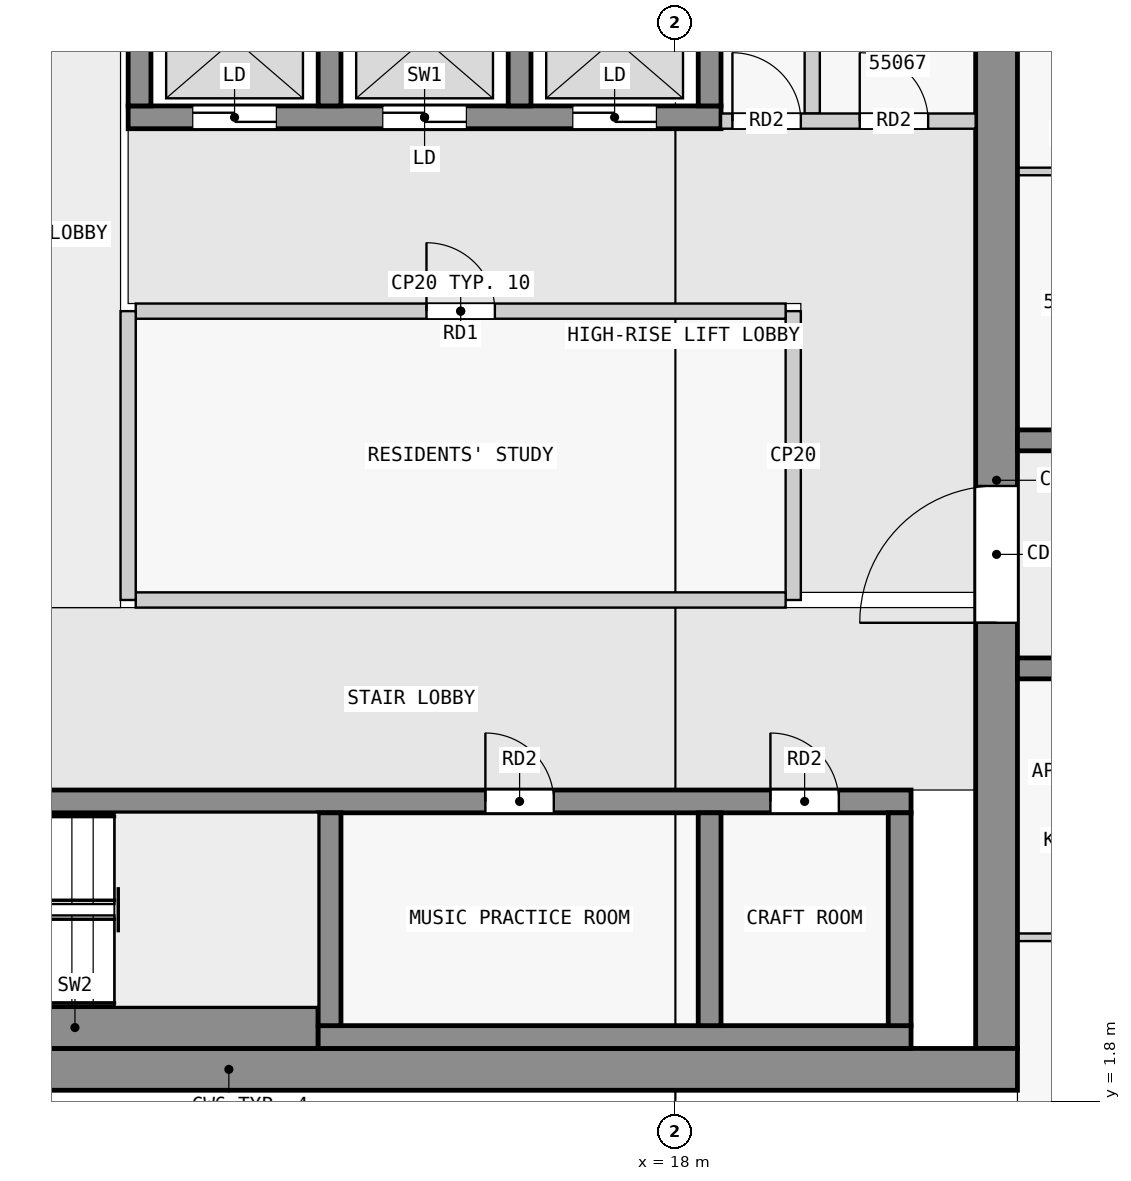
"""IFC4 building model, lengths in metres.
Left out: names, types, materials, properties, quantities, classifications, styles, units other than length and angle.
Written with IfcOpenShell. Run it as: python <this file> out.ifc"""

import sys

from ifc_helpers import new_model, si_unit, direction, frame, frame_2d, origin, place, context, subcontext, project, spatial, rectangle, extrude, element, fill, save


model = new_model("IFC4")
c1 = context("Model", 3, precision=1e-05, world=origin(), true_north=direction((0.0, 1.0)))
c2 = subcontext(c1, "Body", "Model", "MODEL_VIEW")
j1 = project(units=[si_unit("LENGTHUNIT", "METRE"), si_unit("PLANEANGLEUNIT", "RADIAN")], contexts=[c1])
p1 = place(None, origin())
s1 = spatial("IfcSite", under=j1, at=p1, CompositionType="ELEMENT")
p2 = place(p1, origin())
s2 = spatial("IfcBuilding", under=s1, at=p2, CompositionType="ELEMENT")
p3 = place(p2, frame((0.0, 0.0, 211.9)))
s3 = spatial("IfcBuildingStorey", under=s2, at=p3, CompositionType="ELEMENT", Elevation=211.9)
p4 = place(p3, frame((1.75, 2.225, 0.0), z_axis=(0.0, 0.0, 1.0), x_axis=(1.0, 0.0, 0.0)))
e1 = element("IfcWall", 1, at=p4, inside=s3, PredefinedType="SHEAR", context=c2, shape_type="SweptSolid", body=[
    extrude(rectangle(XDim=20.75, YDim=0.55, at=frame_2d((10.375, 0.0))), origin(), (0.0, 0.0, 1.0), 3.25),
])
p5 = place(p3, frame((22.225, 2.5, 0.0), z_axis=(0.0, 0.0, 1.0), x_axis=(0.0, 1.0, 0.0)))
e2 = element("IfcWall", 2, at=p5, inside=s3, PredefinedType="SHEAR", context=c2, shape_type="SweptSolid", body=[
    extrude(rectangle(XDim=14.95, YDim=0.55, at=frame_2d((7.475, 0.0))), origin(), (0.0, 0.0, 1.0), 3.25),
])
p6 = place(p5, frame((5.6, 0.0, 0.0)))
e3 = element("IfcOpeningElement", 3, at=p6, cuts=e2, PredefinedType="OPENING", context=c2, shape_type="SweptSolid", body=[
    extrude(rectangle(XDim=1.8, YDim=2.1, at=frame_2d((0.9, 1.05))), frame((0.0, 0.285, 0.0), z_axis=(0.0, -1.0, 0.0), x_axis=(1.0, 0.0, 0.0)), (0.0, 0.0, 1.0), 0.57),
])
p7 = place(p3, frame((6.9, 2.775, 0.0), z_axis=(0.0, 0.0, 1.0), x_axis=(1.0, 0.0, 0.0)))
e4 = element("IfcWall", 4, at=p7, inside=s3, PredefinedType="SHEAR", context=c2, shape_type="SweptSolid", body=[
    extrude(rectangle(XDim=6.4, YDim=0.55, at=frame_2d((3.2, 0.0))), origin(), (0.0, 0.0, 1.0), 3.25),
])
p8 = place(p3, frame((13.3, 2.65, 0.0), z_axis=(0.0, 0.0, 1.0), x_axis=(1.0, 0.0, 0.0)))
e5 = element("IfcWall", 5, at=p8, inside=s3, PredefinedType="SHEAR", context=c2, shape_type="SweptSolid", body=[
    extrude(rectangle(XDim=7.8, YDim=0.3, at=frame_2d((3.9, 0.0))), origin(), (0.0, 0.0, 1.0), 3.25),
])
for number, where, z_axis, x_axis in (
    (6, (13.45, 2.8, 0.0), (0.0, 0.0, 1.0), (0.0, 1.0, 0.0)),
    (7, (18.45, 2.8, 0.0), (0.0, 0.0, 1.0), (0.0, 1.0, 0.0)),
    (8, (20.95, 2.8, 0.0), (0.0, 0.0, 1.0), (0.0, 1.0, 0.0)),
):
    element("IfcWall", number, at=place(p3, frame(where, z_axis=z_axis, x_axis=x_axis)), inside=s3, PredefinedType="SHEAR", context=c2, shape_type="SweptSolid", body=[
        extrude(rectangle(XDim=2.8, YDim=0.3, at=frame_2d((1.4, 0.0))), origin(), (0.0, 0.0, 1.0), 3.25),
    ])
p9 = place(p3, frame((2.3, 5.75, 0.0), z_axis=(0.0, 0.0, 1.0), x_axis=(1.0, 0.0, 0.0)))
e9 = element("IfcWall", 9, at=p9, inside=s3, PredefinedType="SHEAR", context=c2, shape_type="SweptSolid", body=[
    extrude(rectangle(XDim=18.8, YDim=0.3, at=frame_2d((9.4, 0.0))), origin(), (0.0, 0.0, 1.0), 3.25),
])
p10 = place(p9, frame((4.65, 0.0, 0.0)))
e10 = element("IfcOpeningElement", 10, at=p10, cuts=e9, PredefinedType="OPENING", context=c2, shape_type="SweptSolid", body=[
    extrude(rectangle(XDim=1.1, YDim=2.1, at=frame_2d((0.55, 1.05))), frame((0.0, 0.16, 0.0), z_axis=(0.0, -1.0, 0.0), x_axis=(1.0, 0.0, 0.0)), (0.0, 0.0, 1.0), 0.32),
])
p11 = place(p9, frame((0.45, 0.0, 0.0)))
e11 = element("IfcOpeningElement", 11, at=p11, cuts=e9, PredefinedType="OPENING", context=c2, shape_type="SweptSolid", body=[
    extrude(rectangle(XDim=1.1, YDim=2.1, at=frame_2d((0.55, 1.05))), frame((0.0, 0.16, 0.0), z_axis=(0.0, -1.0, 0.0), x_axis=(1.0, 0.0, 0.0)), (0.0, 0.0, 1.0), 0.32),
])
p12 = place(p9, frame((2.75, 0.0, 0.0)))
e12 = element("IfcOpeningElement", 12, at=p12, cuts=e9, PredefinedType="OPENING", context=c2, shape_type="SweptSolid", body=[
    extrude(rectangle(XDim=1.1, YDim=2.1, at=frame_2d((0.55, 1.05))), frame((0.0, 0.16, 0.0), z_axis=(0.0, -1.0, 0.0), x_axis=(1.0, 0.0, 0.0)), (0.0, 0.0, 1.0), 0.32),
])
p13 = place(p9, frame((13.2, 0.0, 0.0)))
e13 = element("IfcOpeningElement", 13, at=p13, cuts=e9, PredefinedType="OPENING", context=c2, shape_type="SweptSolid", body=[
    extrude(rectangle(XDim=0.9, YDim=2.1, at=frame_2d((0.45, 1.05))), frame((0.0, 0.16, 0.0), z_axis=(0.0, -1.0, 0.0), x_axis=(1.0, 0.0, 0.0)), (0.0, 0.0, 1.0), 0.32),
])
p14 = place(p9, frame((16.95, 0.0, 0.0)))
e14 = element("IfcOpeningElement", 14, at=p14, cuts=e9, PredefinedType="OPENING", context=c2, shape_type="SweptSolid", body=[
    extrude(rectangle(XDim=0.9, YDim=2.1, at=frame_2d((0.45, 1.05))), frame((0.0, 0.16, 0.0), z_axis=(0.0, -1.0, 0.0), x_axis=(1.0, 0.0, 0.0)), (0.0, 0.0, 1.0), 0.32),
])
p15 = place(p3, frame((10.8, 14.75, 0.0), z_axis=(0.0, 0.0, 1.0), x_axis=(1.0, 0.0, 0.0)))
e15 = element("IfcWall", 15, at=p15, inside=s3, PredefinedType="SHEAR", context=c2, shape_type="SweptSolid", body=[
    extrude(rectangle(XDim=7.8, YDim=0.3, at=frame_2d((3.9, 0.0))), origin(), (0.0, 0.0, 1.0), 3.25),
])
p16 = place(p15, frame((0.85, 0.0, 0.0)))
e16 = element("IfcOpeningElement", 16, at=p16, cuts=e15, PredefinedType="OPENING", context=c2, shape_type="SweptSolid", body=[
    extrude(rectangle(XDim=1.1, YDim=2.1, at=frame_2d((0.55, 1.05))), frame((0.0, 0.16, 0.0), z_axis=(0.0, -1.0, 0.0), x_axis=(1.0, 0.0, 0.0)), (0.0, 0.0, 1.0), 0.32),
])
p17 = place(p15, frame((3.35, 0.0, 0.0)))
e17 = element("IfcOpeningElement", 17, at=p17, cuts=e15, PredefinedType="OPENING", context=c2, shape_type="SweptSolid", body=[
    extrude(rectangle(XDim=1.1, YDim=2.1, at=frame_2d((0.55, 1.05))), frame((0.0, 0.16, 0.0), z_axis=(0.0, -1.0, 0.0), x_axis=(1.0, 0.0, 0.0)), (0.0, 0.0, 1.0), 0.32),
])
p18 = place(p15, frame((5.85, 0.0, 0.0)))
e18 = element("IfcOpeningElement", 18, at=p18, cuts=e15, PredefinedType="OPENING", context=c2, shape_type="SweptSolid", body=[
    extrude(rectangle(XDim=1.1, YDim=2.1, at=frame_2d((0.55, 1.05))), frame((0.0, 0.16, 0.0), z_axis=(0.0, -1.0, 0.0), x_axis=(1.0, 0.0, 0.0)), (0.0, 0.0, 1.0), 0.32),
])
for number, where, z_axis, x_axis in (
    (19, (10.95, 14.9, 0.0), (0.0, 0.0, 1.0), (0.0, 1.0, 0.0)),
    (20, (13.45, 14.9, 0.0), (0.0, 0.0, 1.0), (0.0, 1.0, 0.0)),
    (21, (15.95, 14.9, 0.0), (0.0, 0.0, 1.0), (0.0, 1.0, 0.0)),
    (22, (18.45, 14.9, 0.0), (0.0, 0.0, 1.0), (0.0, 1.0, 0.0)),
):
    element("IfcWall", number, at=place(p3, frame(where, z_axis=z_axis, x_axis=x_axis)), inside=s3, PredefinedType="SHEAR", context=c2, shape_type="SweptSolid", body=[
        extrude(rectangle(XDim=2.0, YDim=0.3, at=frame_2d((1.0, 0.0))), origin(), (0.0, 0.0, 1.0), 3.25),
    ])
p19 = place(p3, frame((22.5, 7.5, 0.0), z_axis=(0.0, 0.0, 1.0), x_axis=(1.0, 0.0, 0.0)))
e23 = element("IfcWall", 23, at=p19, inside=s3, PredefinedType="SHEAR", context=c2, shape_type="SweptSolid", body=[
    extrude(rectangle(XDim=22.5, YDim=0.275, at=frame_2d((11.25, 0.0))), origin(), (0.0, 0.0, 1.0), 3.25),
])
p20 = place(p19, frame((4.05, 0.0, 0.0)))
e24 = element("IfcOpeningElement", 24, at=p20, cuts=e23, PredefinedType="OPENING", context=c2, shape_type="SweptSolid", body=[
    extrude(rectangle(XDim=1.0, YDim=2.1, at=frame_2d((0.5, 1.05))), frame((0.0, 0.147, 0.0), z_axis=(0.0, -1.0, 0.0), x_axis=(1.0, 0.0, 0.0)), (0.0, 0.0, 1.0), 0.295),
])
p21 = place(p19, frame((10.75, 0.0, 0.0)))
e25 = element("IfcOpeningElement", 25, at=p21, cuts=e23, PredefinedType="OPENING", context=c2, shape_type="SweptSolid", body=[
    extrude(rectangle(XDim=1.0, YDim=2.1, at=frame_2d((0.5, 1.05))), frame((0.0, 0.147, 0.0), z_axis=(0.0, -1.0, 0.0), x_axis=(1.0, 0.0, 0.0)), (0.0, 0.0, 1.0), 0.295),
])
p22 = place(p19, frame((15.25, 0.0, 0.0)))
e26 = element("IfcOpeningElement", 26, at=p22, cuts=e23, PredefinedType="OPENING", context=c2, shape_type="SweptSolid", body=[
    extrude(rectangle(XDim=1.0, YDim=2.1, at=frame_2d((0.5, 1.05))), frame((0.0, 0.147, 0.0), z_axis=(0.0, -1.0, 0.0), x_axis=(1.0, 0.0, 0.0)), (0.0, 0.0, 1.0), 0.295),
])
p23 = place(p19, frame((18.75, 0.0, 0.0)))
e27 = element("IfcOpeningElement", 27, at=p23, cuts=e23, PredefinedType="OPENING", context=c2, shape_type="SweptSolid", body=[
    extrude(rectangle(XDim=0.9, YDim=2.1, at=frame_2d((0.45, 1.05))), frame((0.0, 0.147, 0.0), z_axis=(0.0, -1.0, 0.0), x_axis=(1.0, 0.0, 0.0)), (0.0, 0.0, 1.0), 0.295),
])
p24 = place(p19, frame((20.95, 0.0, 0.0)))
e28 = element("IfcOpeningElement", 28, at=p24, cuts=e23, PredefinedType="OPENING", context=c2, shape_type="SweptSolid", body=[
    extrude(rectangle(XDim=1.0, YDim=2.1, at=frame_2d((0.5, 1.05))), frame((0.0, 0.147, 0.0), z_axis=(0.0, -1.0, 0.0), x_axis=(1.0, 0.0, 0.0)), (0.0, 0.0, 1.0), 0.295),
])
p25 = place(p3, frame((22.5, 10.5, 0.0), z_axis=(0.0, 0.0, 1.0), x_axis=(1.0, 0.0, 0.0)))
e29 = element("IfcWall", 29, at=p25, inside=s3, PredefinedType="SHEAR", context=c2, shape_type="SweptSolid", body=[
    extrude(rectangle(XDim=22.5, YDim=0.275, at=frame_2d((11.25, 0.0))), origin(), (0.0, 0.0, 1.0), 3.25),
])
p26 = place(p25, frame((1.75, 0.0, 0.0)))
e30 = element("IfcOpeningElement", 30, at=p26, cuts=e29, PredefinedType="OPENING", context=c2, shape_type="SweptSolid", body=[
    extrude(rectangle(XDim=1.0, YDim=2.1, at=frame_2d((0.5, 1.05))), frame((0.0, 0.147, 0.0), z_axis=(0.0, -1.0, 0.0), x_axis=(1.0, 0.0, 0.0)), (0.0, 0.0, 1.0), 0.295),
])
p27 = place(p25, frame((5.85, 0.0, 0.0)))
e31 = element("IfcOpeningElement", 31, at=p27, cuts=e29, PredefinedType="OPENING", context=c2, shape_type="SweptSolid", body=[
    extrude(rectangle(XDim=1.8, YDim=2.1, at=frame_2d((0.9, 1.05))), frame((0.0, 0.147, 0.0), z_axis=(0.0, -1.0, 0.0), x_axis=(1.0, 0.0, 0.0)), (0.0, 0.0, 1.0), 0.295),
])
p28 = place(p25, frame((10.75, 0.0, 0.0)))
e32 = element("IfcOpeningElement", 32, at=p28, cuts=e29, PredefinedType="OPENING", context=c2, shape_type="SweptSolid", body=[
    extrude(rectangle(XDim=1.0, YDim=2.1, at=frame_2d((0.5, 1.05))), frame((0.0, 0.147, 0.0), z_axis=(0.0, -1.0, 0.0), x_axis=(1.0, 0.0, 0.0)), (0.0, 0.0, 1.0), 0.295),
])
p29 = place(p25, frame((16.85, 0.0, 0.0)))
e33 = element("IfcOpeningElement", 33, at=p29, cuts=e29, PredefinedType="OPENING", context=c2, shape_type="SweptSolid", body=[
    extrude(rectangle(XDim=1.0, YDim=2.1, at=frame_2d((0.5, 1.05))), frame((0.0, 0.147, 0.0), z_axis=(0.0, -1.0, 0.0), x_axis=(1.0, 0.0, 0.0)), (0.0, 0.0, 1.0), 0.295),
])
p30 = place(p3, frame((10.8, 8.4, 0.0), z_axis=(0.0, 0.0, 1.0), x_axis=(0.0, 1.0, 0.0)))
e34 = element("IfcWall", 34, at=p30, inside=s3, PredefinedType="PARTITIONING", context=c2, shape_type="SweptSolid", body=[
    extrude(rectangle(XDim=3.8, YDim=0.2, at=frame_2d((1.9, 0.0))), origin(), (0.0, 0.0, 1.0), 3.25),
])
p31 = place(p3, frame((10.9, 8.4, 0.0), z_axis=(0.0, 0.0, 1.0), x_axis=(1.0, 0.0, 0.0)))
e35 = element("IfcWall", 35, at=p31, inside=s3, PredefinedType="PARTITIONING", context=c2, shape_type="SweptSolid", body=[
    extrude(rectangle(XDim=8.55, YDim=0.2, at=frame_2d((4.275, 0.0))), origin(), (0.0, 0.0, 1.0), 3.25),
])
p32 = place(p3, frame((19.55, 8.4, 0.0), z_axis=(0.0, 0.0, 1.0), x_axis=(0.0, 1.0, 0.0)))
e36 = element("IfcWall", 36, at=p32, inside=s3, PredefinedType="PARTITIONING", context=c2, shape_type="SweptSolid", body=[
    extrude(rectangle(XDim=3.8, YDim=0.2, at=frame_2d((1.9, 0.0))), origin(), (0.0, 0.0, 1.0), 3.25),
])
p33 = place(p3, frame((10.9, 12.2, 0.0), z_axis=(0.0, 0.0, 1.0), x_axis=(1.0, 0.0, 0.0)))
e37 = element("IfcWall", 37, at=p33, inside=s3, PredefinedType="PARTITIONING", context=c2, shape_type="SweptSolid", body=[
    extrude(rectangle(XDim=8.55, YDim=0.2, at=frame_2d((4.275, 0.0))), origin(), (0.0, 0.0, 1.0), 3.25),
])
p34 = place(p33, frame((3.825, 0.0, 0.0)))
e38 = element("IfcOpeningElement", 38, at=p34, cuts=e37, PredefinedType="OPENING", context=c2, shape_type="SweptSolid", body=[
    extrude(rectangle(XDim=0.9, YDim=2.1, at=frame_2d((0.45, 1.05))), frame((0.0, 0.11, 0.0), z_axis=(0.0, -1.0, 0.0), x_axis=(1.0, 0.0, 0.0)), (0.0, 0.0, 1.0), 0.22),
])
p35 = place(p3, frame((18.6, 14.7, 0.0), z_axis=(0.0, 0.0, 1.0), x_axis=(1.0, 0.0, 0.0)))
e39 = element("IfcWall", 39, at=p35, inside=s3, PredefinedType="PARTITIONING", context=c2, shape_type="SweptSolid", body=[
    extrude(rectangle(XDim=3.35, YDim=0.2, at=frame_2d((1.675, 0.0))), origin(), (0.0, 0.0, 1.0), 3.25),
])
p36 = place(p35, frame((0.15, 0.0, 0.0)))
e40 = element("IfcOpeningElement", 40, at=p36, cuts=e39, PredefinedType="OPENING", context=c2, shape_type="SweptSolid", body=[
    extrude(rectangle(XDim=0.9, YDim=2.1, at=frame_2d((0.45, 1.05))), frame((0.0, 0.11, 0.0), z_axis=(0.0, -1.0, 0.0), x_axis=(1.0, 0.0, 0.0)), (0.0, 0.0, 1.0), 0.22),
])
p37 = place(p35, frame((1.825, 0.0, 0.0)))
e41 = element("IfcOpeningElement", 41, at=p37, cuts=e39, PredefinedType="OPENING", context=c2, shape_type="SweptSolid", body=[
    extrude(rectangle(XDim=0.9, YDim=2.1, at=frame_2d((0.45, 1.05))), frame((0.0, 0.11, 0.0), z_axis=(0.0, -1.0, 0.0), x_axis=(1.0, 0.0, 0.0)), (0.0, 0.0, 1.0), 0.22),
])
p38 = place(p3, frame((19.8, 14.8, 0.0), z_axis=(0.0, 0.0, 1.0), x_axis=(0.0, 1.0, 0.0)))
e42 = element("IfcWall", 42, at=p38, inside=s3, PredefinedType="PARTITIONING", context=c2, shape_type="SweptSolid", body=[
    extrude(rectangle(XDim=2.65, YDim=0.2, at=frame_2d((1.325, 0.0))), origin(), (0.0, 0.0, 1.0), 3.25),
])
p39 = place(p3, frame((22.5, 3.962, 0.0), z_axis=(0.0, 0.0, 1.0), x_axis=(1.0, 0.0, 0.0)))
e43 = element("IfcWall", 43, at=p39, inside=s3, PredefinedType="PARTITIONING", context=c2, shape_type="SweptSolid", body=[
    extrude(rectangle(XDim=1.75, YDim=0.1, at=frame_2d((0.875, 0.0))), origin(), (0.0, 0.0, 1.0), 3.25),
])
p40 = place(p3, frame((23.95, 14.038, 0.0), z_axis=(0.0, 0.0, 1.0), x_axis=(-1.0, 0.0, 0.0)))
e44 = element("IfcWall", 44, at=p40, inside=s3, PredefinedType="PARTITIONING", context=c2, shape_type="SweptSolid", body=[
    extrude(rectangle(XDim=1.45, YDim=0.1, at=frame_2d((0.725, 0.0))), origin(), (0.0, 0.0, 1.0), 3.25),
])
p41 = place(p34, origin())
e45 = element("IfcDoor", 45, at=p41, inside=s3, OperationType="SINGLE_SWING_LEFT", PredefinedType="DOOR", context=c2, shape_type="SweptSolid", body=[
    extrude(rectangle(XDim=0.9, YDim=2.1, at=frame_2d((0.45, 1.05))), frame((0.0, 0.025, 0.0), z_axis=(0.0, -1.0, 0.0), x_axis=(1.0, 0.0, 0.0)), (0.0, 0.0, 1.0), 0.05),
])
fill(e38, e45)
p42 = place(p16, origin())
e46 = element("IfcDoor", 46, at=p42, inside=s3, OperationType="DOUBLE_DOOR_SLIDING", PredefinedType="DOOR", context=c2, shape_type="SweptSolid", body=[
    extrude(rectangle(XDim=1.1, YDim=2.1, at=frame_2d((0.55, 1.05))), frame((0.0, 0.025, 0.0), z_axis=(0.0, -1.0, 0.0), x_axis=(1.0, 0.0, 0.0)), (0.0, 0.0, 1.0), 0.05),
])
fill(e16, e46)
p43 = place(p17, origin())
e47 = element("IfcDoor", 47, at=p43, inside=s3, OperationType="DOUBLE_DOOR_SLIDING", PredefinedType="DOOR", context=c2, shape_type="SweptSolid", body=[
    extrude(rectangle(XDim=1.1, YDim=2.1, at=frame_2d((0.55, 1.05))), frame((0.0, 0.025, 0.0), z_axis=(0.0, -1.0, 0.0), x_axis=(1.0, 0.0, 0.0)), (0.0, 0.0, 1.0), 0.05),
])
fill(e17, e47)
p44 = place(p18, origin())
e48 = element("IfcDoor", 48, at=p44, inside=s3, OperationType="DOUBLE_DOOR_SLIDING", PredefinedType="DOOR", context=c2, shape_type="SweptSolid", body=[
    extrude(rectangle(XDim=1.1, YDim=2.1, at=frame_2d((0.55, 1.05))), frame((0.0, 0.025, 0.0), z_axis=(0.0, -1.0, 0.0), x_axis=(1.0, 0.0, 0.0)), (0.0, 0.0, 1.0), 0.05),
])
fill(e18, e48)
p45 = place(p6, origin())
e49 = element("IfcDoor", 49, at=p45, inside=s3, OperationType="DOUBLE_DOOR_SINGLE_SWING", PredefinedType="DOOR", context=c2, shape_type="SweptSolid", body=[
    extrude(rectangle(XDim=1.8, YDim=2.1, at=frame_2d((0.9, 1.05))), frame((0.0, 0.025, 0.0), z_axis=(0.0, -1.0, 0.0), x_axis=(1.0, 0.0, 0.0)), (0.0, 0.0, 1.0), 0.05),
])
fill(e3, e49)
p46 = place(p36, origin())
e50 = element("IfcDoor", 50, at=p46, inside=s3, OperationType="SINGLE_SWING_LEFT", PredefinedType="DOOR", context=c2, shape_type="SweptSolid", body=[
    extrude(rectangle(XDim=0.9, YDim=2.1, at=frame_2d((0.45, 1.05))), frame((0.0, 0.025, 0.0), z_axis=(0.0, -1.0, 0.0), x_axis=(1.0, 0.0, 0.0)), (0.0, 0.0, 1.0), 0.05),
])
fill(e40, e50)
p47 = place(p37, origin())
e51 = element("IfcDoor", 51, at=p47, inside=s3, OperationType="SINGLE_SWING_LEFT", PredefinedType="DOOR", context=c2, shape_type="SweptSolid", body=[
    extrude(rectangle(XDim=0.9, YDim=2.1, at=frame_2d((0.45, 1.05))), frame((0.0, 0.025, 0.0), z_axis=(0.0, -1.0, 0.0), x_axis=(1.0, 0.0, 0.0)), (0.0, 0.0, 1.0), 0.05),
])
fill(e41, e51)
p48 = place(p13, origin())
e52 = element("IfcDoor", 52, at=p48, inside=s3, OperationType="SINGLE_SWING_LEFT", PredefinedType="DOOR", context=c2, shape_type="SweptSolid", body=[
    extrude(rectangle(XDim=0.9, YDim=2.1, at=frame_2d((0.45, 1.05))), frame((0.0, 0.025, 0.0), z_axis=(0.0, -1.0, 0.0), x_axis=(1.0, 0.0, 0.0)), (0.0, 0.0, 1.0), 0.05),
])
fill(e13, e52)
p49 = place(p14, origin())
e53 = element("IfcDoor", 53, at=p49, inside=s3, OperationType="SINGLE_SWING_LEFT", PredefinedType="DOOR", context=c2, shape_type="SweptSolid", body=[
    extrude(rectangle(XDim=0.9, YDim=2.1, at=frame_2d((0.45, 1.05))), frame((0.0, 0.025, 0.0), z_axis=(0.0, -1.0, 0.0), x_axis=(1.0, 0.0, 0.0)), (0.0, 0.0, 1.0), 0.05),
])
fill(e14, e53)
save(model, sys.argv[1])
